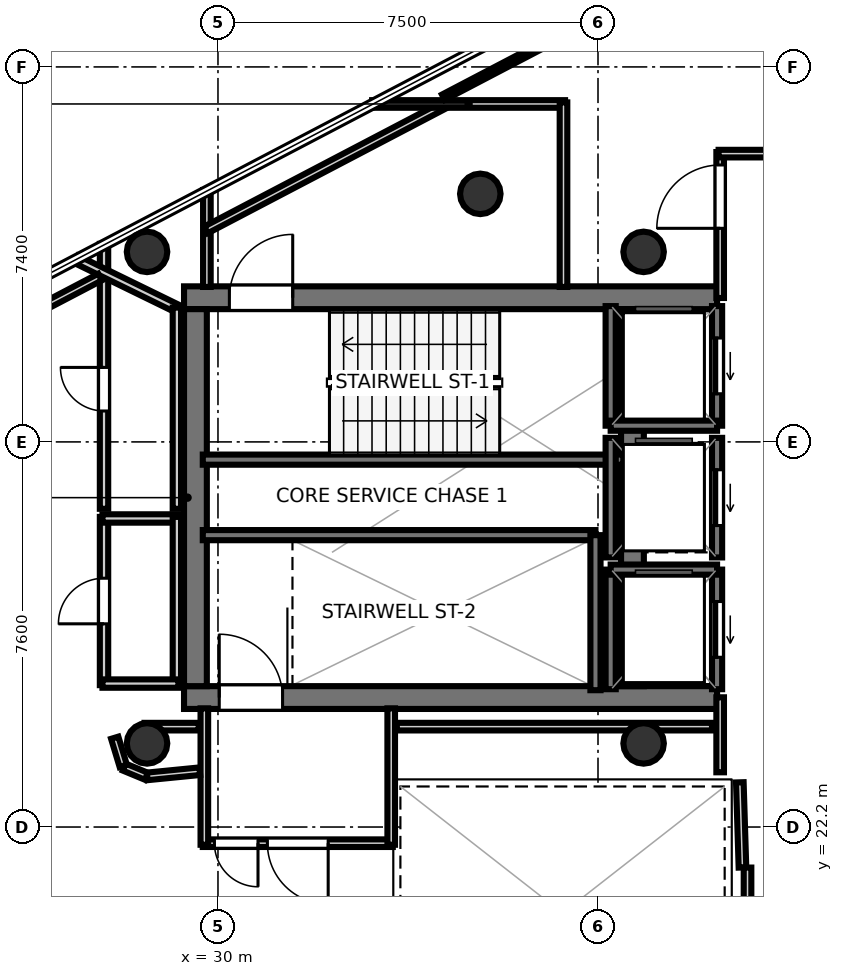
"""IFC4 building model, lengths in metres.
Left out: names, types, materials, properties, quantities, classifications, styles, units other than length and angle.
Written with IfcOpenShell. Run it as: python <this file> out.ifc"""

import sys

from ifc_helpers import new_model, si_unit, direction, frame, frame_2d, origin, origin_2d, place, context, subcontext, project, spatial, rectangle, hollow_circle, extrude, element, fill, save


model = new_model("IFC4")
c1 = context("Model", 3, precision=1e-05, world=origin(), true_north=direction((0.0, 1.0)))
c2 = subcontext(c1, "Body", "Model", "MODEL_VIEW")
j1 = project(units=[si_unit("LENGTHUNIT", "METRE"), si_unit("PLANEANGLEUNIT", "RADIAN")], contexts=[c1])
p1 = place(None, origin())
s1 = spatial("IfcSite", under=j1, at=p1, CompositionType="ELEMENT")
p2 = place(p1, origin())
s2 = spatial("IfcBuilding", under=s1, at=p2, CompositionType="ELEMENT")
p3 = place(p2, frame((0.0, 0.0, 351.8)))
s3 = spatial("IfcBuildingStorey", under=s2, at=p3, CompositionType="ELEMENT", Elevation=351.8)
p4 = place(p3, frame((29.33, 32.645, 0.0), z_axis=(0.0, 0.0, 1.0), x_axis=(1.0, 0.0, 0.0)))
e1 = element("IfcWall", 1, at=p4, inside=s3, PredefinedType="SHEAR", context=c2, shape_type="SweptSolid", body=[
    extrude(rectangle(XDim=10.52, YDim=0.45, at=frame_2d((5.26, 0.0))), origin(), (0.0, 0.0, 1.0), 4.3),
])
p5 = place(p4, frame((0.895, 0.0, 0.0)))
e2 = element("IfcOpeningElement", 2, at=p5, cuts=e1, PredefinedType="OPENING", context=c2, shape_type="SweptSolid", body=[
    extrude(rectangle(XDim=1.25, YDim=2.15, at=frame_2d((0.625, 1.075))), frame((0.0, 0.235, 0.0), z_axis=(0.0, -1.0, 0.0), x_axis=(1.0, 0.0, 0.0)), (0.0, 0.0, 1.0), 0.47),
])
p6 = place(p3, frame((29.33, 24.755, 0.0), z_axis=(0.0, 0.0, 1.0), x_axis=(1.0, 0.0, 0.0)))
e3 = element("IfcWall", 3, at=p6, inside=s3, PredefinedType="SHEAR", context=c2, shape_type="SweptSolid", body=[
    extrude(rectangle(XDim=10.52, YDim=0.45, at=frame_2d((5.26, 0.0))), origin(), (0.0, 0.0, 1.0), 4.3),
])
p7 = place(p6, frame((0.695, 0.0, 0.0)))
e4 = element("IfcOpeningElement", 4, at=p7, cuts=e3, PredefinedType="OPENING", context=c2, shape_type="SweptSolid", body=[
    extrude(rectangle(XDim=1.25, YDim=2.15, at=frame_2d((0.625, 1.075))), frame((0.0, 0.235, 0.0), z_axis=(0.0, -1.0, 0.0), x_axis=(1.0, 0.0, 0.0)), (0.0, 0.0, 1.0), 0.47),
])
for number, where, z_axis, x_axis in (
    (5, (29.555, 24.98, 0.0), (0.0, 0.0, 1.0), (0.0, 1.0, 0.0)),
    (6, (38.18, 24.98, 0.0), (0.0, 0.0, 1.0), (0.0, 1.0, 0.0)),
):
    element("IfcWall", number, at=place(p3, frame(where, z_axis=z_axis, x_axis=x_axis)), inside=s3, PredefinedType="SHEAR", context=c2, shape_type="SweptSolid", body=[
        extrude(rectangle(XDim=7.44, YDim=0.45, at=frame_2d((3.72, 0.0))), origin(), (0.0, 0.0, 1.0), 4.3),
    ])
for number, where, z_axis, x_axis in (
    (7, (28.6, 33.55, 0.0), (0.0, 0.0, 1.0), (1.0, 0.0, 0.0)),
    (8, (28.6, 23.85, 0.0), (0.0, 0.0, 1.0), (1.0, 0.0, 0.0)),
    (9, (38.4, 33.55, 0.0), (0.0, 0.0, 1.0), (1.0, 0.0, 0.0)),
    (10, (38.4, 23.85, 0.0), (0.0, 0.0, 1.0), (1.0, 0.0, 0.0)),
    (11, (35.177, 34.695, 0.0), (0.0, 0.0, 1.0), (1.0, 0.0, 0.0)),
):
    element("IfcColumn", number, at=place(p3, frame(where, z_axis=z_axis, x_axis=x_axis)), inside=s3, PredefinedType="COLUMN", context=c2, shape_type="SweptSolid", body=[
        extrude(hollow_circle(Radius=0.4, WallThickness=0.022, at=origin_2d()), origin(), (0.0, 0.0, 1.0), 4.5),
    ])
p8 = place(p3, frame((29.7, 29.45, 0.0), z_axis=(0.0, 0.0, 1.0), x_axis=(1.0, 0.0, 0.0)))
e12 = element("IfcWall", 12, at=p8, inside=s3, PredefinedType="SOLIDWALL", context=c2, shape_type="SweptSolid", body=[
    extrude(rectangle(XDim=8.3, YDim=0.2, at=frame_2d((4.15, 0.0))), origin(), (0.0, 0.0, 1.0), 4.3),
])
p9 = place(p3, frame((29.7, 27.96, 0.0), z_axis=(0.0, 0.0, 1.0), x_axis=(1.0, 0.0, 0.0)))
e13 = element("IfcWall", 13, at=p9, inside=s3, PredefinedType="SOLIDWALL", context=c2, shape_type="SweptSolid", body=[
    extrude(rectangle(XDim=7.75, YDim=0.2, at=frame_2d((3.875, 0.0))), origin(), (0.0, 0.0, 1.0), 4.3),
])
p10 = place(p3, frame((37.45, 24.9, 0.0), z_axis=(0.0, 0.0, 1.0), x_axis=(0.0, 1.0, 0.0)))
e14 = element("IfcWall", 14, at=p10, inside=s3, PredefinedType="SOLIDWALL", context=c2, shape_type="SweptSolid", body=[
    extrude(rectangle(XDim=3.06, YDim=0.2, at=frame_2d((1.53, 0.0))), origin(), (0.0, 0.0, 1.0), 4.3),
])
p11 = place(p3, frame((39.85, 30.12, 0.0), z_axis=(0.0, 0.0, 1.0), x_axis=(0.0, 1.0, 0.0)))
e15 = element("IfcWall", 15, at=p11, inside=s3, PredefinedType="SOLIDWALL", context=c2, shape_type="SweptSolid", body=[
    extrude(rectangle(XDim=2.36, YDim=0.2, at=frame_2d((1.18, 0.0))), origin(), (0.0, 0.0, 1.0), 4.3),
])
p12 = place(p11, frame((0.63, 0.0, 0.0)))
e16 = element("IfcOpeningElement", 16, at=p12, cuts=e15, PredefinedType="OPENING", context=c2, shape_type="SweptSolid", body=[
    extrude(rectangle(XDim=1.1, YDim=2.15, at=frame_2d((0.55, 1.075))), frame((0.0, 0.11, 0.0), z_axis=(0.0, -1.0, 0.0), x_axis=(1.0, 0.0, 0.0)), (0.0, 0.0, 1.0), 0.22),
])
p13 = place(p3, frame((37.75, 30.12, 0.0), z_axis=(0.0, 0.0, 1.0), x_axis=(0.0, 1.0, 0.0)))
e17 = element("IfcWall", 17, at=p13, inside=s3, PredefinedType="SOLIDWALL", context=c2, shape_type="SweptSolid", body=[
    extrude(rectangle(XDim=2.36, YDim=0.2, at=frame_2d((1.18, 0.0))), origin(), (0.0, 0.0, 1.0), 4.3),
])
p14 = place(p3, frame((37.75, 30.12, 0.0), z_axis=(0.0, 0.0, 1.0), x_axis=(1.0, 0.0, 0.0)))
e18 = element("IfcWall", 18, at=p14, inside=s3, PredefinedType="SOLIDWALL", context=c2, shape_type="SweptSolid", body=[
    extrude(rectangle(XDim=2.1, YDim=0.2, at=frame_2d((1.05, 0.0))), origin(), (0.0, 0.0, 1.0), 4.3),
])
p15 = place(p3, frame((39.85, 24.92, 0.0), z_axis=(0.0, 0.0, 1.0), x_axis=(0.0, 1.0, 0.0)))
e19 = element("IfcWall", 19, at=p15, inside=s3, PredefinedType="SOLIDWALL", context=c2, shape_type="SweptSolid", body=[
    extrude(rectangle(XDim=2.36, YDim=0.2, at=frame_2d((1.18, 0.0))), origin(), (0.0, 0.0, 1.0), 4.3),
])
p16 = place(p15, frame((0.63, 0.0, 0.0)))
e20 = element("IfcOpeningElement", 20, at=p16, cuts=e19, PredefinedType="OPENING", context=c2, shape_type="SweptSolid", body=[
    extrude(rectangle(XDim=1.1, YDim=2.15, at=frame_2d((0.55, 1.075))), frame((0.0, 0.11, 0.0), z_axis=(0.0, -1.0, 0.0), x_axis=(1.0, 0.0, 0.0)), (0.0, 0.0, 1.0), 0.22),
])
p17 = place(p3, frame((37.75, 24.92, 0.0), z_axis=(0.0, 0.0, 1.0), x_axis=(0.0, 1.0, 0.0)))
e21 = element("IfcWall", 21, at=p17, inside=s3, PredefinedType="SOLIDWALL", context=c2, shape_type="SweptSolid", body=[
    extrude(rectangle(XDim=2.36, YDim=0.2, at=frame_2d((1.18, 0.0))), origin(), (0.0, 0.0, 1.0), 4.3),
])
p18 = place(p3, frame((37.75, 27.28, 0.0), z_axis=(0.0, 0.0, 1.0), x_axis=(1.0, 0.0, 0.0)))
e22 = element("IfcWall", 22, at=p18, inside=s3, PredefinedType="SOLIDWALL", context=c2, shape_type="SweptSolid", body=[
    extrude(rectangle(XDim=2.1, YDim=0.2, at=frame_2d((1.05, 0.0))), origin(), (0.0, 0.0, 1.0), 4.3),
])
p19 = place(p3, frame((39.85, 27.52, 0.0), z_axis=(0.0, 0.0, 1.0), x_axis=(0.0, 1.0, 0.0)))
e23 = element("IfcWall", 23, at=p19, inside=s3, PredefinedType="SOLIDWALL", context=c2, shape_type="SweptSolid", body=[
    extrude(rectangle(XDim=2.36, YDim=0.2, at=frame_2d((1.18, 0.0))), origin(), (0.0, 0.0, 1.0), 4.3),
])
p20 = place(p19, frame((0.63, 0.0, 0.0)))
e24 = element("IfcOpeningElement", 24, at=p20, cuts=e23, PredefinedType="OPENING", context=c2, shape_type="SweptSolid", body=[
    extrude(rectangle(XDim=1.1, YDim=2.15, at=frame_2d((0.55, 1.075))), frame((0.0, 0.11, 0.0), z_axis=(0.0, -1.0, 0.0), x_axis=(1.0, 0.0, 0.0)), (0.0, 0.0, 1.0), 0.22),
])
p21 = place(p3, frame((37.75, 27.52, 0.0), z_axis=(0.0, 0.0, 1.0), x_axis=(0.0, 1.0, 0.0)))
e25 = element("IfcWall", 25, at=p21, inside=s3, PredefinedType="SOLIDWALL", context=c2, shape_type="SweptSolid", body=[
    extrude(rectangle(XDim=2.36, YDim=0.2, at=frame_2d((1.18, 0.0))), origin(), (0.0, 0.0, 1.0), 4.3),
])
p22 = place(p3, frame((29.781, 32.858, 0.0), z_axis=(0.0, 0.0, 1.0), x_axis=(0.0, 1.0, 0.0)))
e26 = element("IfcWall", 26, at=p22, inside=s3, PredefinedType="PARTITIONING", context=c2, shape_type="SweptSolid", body=[
    extrude(rectangle(XDim=1.913, YDim=0.15, at=frame_2d((0.957, 0.0))), origin(), (0.0, 0.0, 1.0), 2.82),
])
p23 = place(p3, frame((29.764, 33.985, 0.0), z_axis=(0.0, 0.0, 1.0), x_axis=(0.885903695569, 0.46386920805, 0.0)))
e27 = element("IfcWall", 27, at=p23, inside=s3, PredefinedType="PARTITIONING", context=c2, shape_type="SweptSolid", body=[
    extrude(rectangle(XDim=5.363, YDim=0.15, at=frame_2d((2.682, 0.0))), origin(), (0.0, 0.0, 1.0), 2.82),
])
p24 = place(p3, frame((33.042, 36.469, 0.0), z_axis=(0.0, 0.0, 1.0), x_axis=(1.0, 0.0, 0.0)))
e28 = element("IfcWall", 28, at=p24, inside=s3, PredefinedType="PARTITIONING", context=c2, shape_type="SweptSolid", body=[
    extrude(rectangle(XDim=3.808, YDim=0.15, at=frame_2d((1.904, 0.0))), origin(), (0.0, 0.0, 1.0), 2.82),
])
p25 = place(p3, frame((36.819, 36.5, 0.0), z_axis=(0.0, 0.0, 1.0), x_axis=(0.0, -1.0, 0.0)))
e29 = element("IfcWall", 29, at=p25, inside=s3, PredefinedType="PARTITIONING", context=c2, shape_type="SweptSolid", body=[
    extrude(rectangle(XDim=3.642, YDim=0.15, at=frame_2d((1.821, 0.0))), origin(), (0.0, 0.0, 1.0), 2.82),
])
p26 = place(p3, frame((33.45, 21.881, 0.0), z_axis=(0.0, 0.0, 1.0), x_axis=(-1.0, 0.0, 0.0)))
e30 = element("IfcWall", 30, at=p26, inside=s3, PredefinedType="PARTITIONING", context=c2, shape_type="SweptSolid", body=[
    extrude(rectangle(XDim=3.75, YDim=0.15, at=frame_2d((1.875, 0.0))), origin(), (0.0, 0.0, 1.0), 2.82),
])
p27 = place(p26, frame((1.275, 0.0, 0.0)))
e31 = element("IfcOpeningElement", 31, at=p27, cuts=e30, PredefinedType="OPENING", context=c2, shape_type="SweptSolid", body=[
    extrude(rectangle(XDim=1.2, YDim=2.15, at=frame_2d((0.6, 1.075))), frame((0.0, 0.085, 0.0), z_axis=(0.0, -1.0, 0.0), x_axis=(1.0, 0.0, 0.0)), (0.0, 0.0, 1.0), 0.17),
])
p28 = place(p26, frame((2.66, 0.0, 0.0)))
e32 = element("IfcOpeningElement", 32, at=p28, cuts=e30, PredefinedType="OPENING", context=c2, shape_type="SweptSolid", body=[
    extrude(rectangle(XDim=0.86, YDim=2.05, at=frame_2d((0.43, 1.025))), frame((0.0, 0.085, 0.0), z_axis=(0.0, -1.0, 0.0), x_axis=(1.0, 0.0, 0.0)), (0.0, 0.0, 1.0), 0.17),
])
for number, where, z_axis, x_axis in (
    (33, (29.731, 21.85, 0.0), (0.0, 0.0, 1.0), (0.0, 1.0, 0.0)),
    (34, (33.419, 24.542, 0.0), (0.0, 0.0, 1.0), (0.0, -1.0, 0.0)),
):
    element("IfcWall", number, at=place(p3, frame(where, z_axis=z_axis, x_axis=x_axis)), inside=s3, PredefinedType="PARTITIONING", context=c2, shape_type="SweptSolid", body=[
        extrude(rectangle(XDim=2.692, YDim=0.15, at=frame_2d((1.346, 0.0))), origin(), (0.0, 0.0, 1.0), 2.82),
    ])
p29 = place(p3, frame((40.351, 21.401, 0.0), z_axis=(0.0, 0.0, 1.0), x_axis=(-0.031058045979, 0.999517582527, 0.0)))
e35 = element("IfcWall", 35, at=p29, inside=s3, PredefinedType="PARTITIONING", context=c2, shape_type="SweptSolid", body=[
    extrude(rectangle(XDim=1.682, YDim=0.15, at=frame_2d((0.841, 0.0))), origin(), (0.0, 0.0, 1.0), 2.82),
])
p30 = place(p3, frame((39.911, 23.28, 0.0), z_axis=(0.0, 0.0, 1.0), x_axis=(0.0, 1.0, 0.0)))
e36 = element("IfcWall", 36, at=p30, inside=s3, PredefinedType="PARTITIONING", context=c2, shape_type="SweptSolid", body=[
    extrude(rectangle(XDim=1.48, YDim=0.15, at=frame_2d((0.74, 0.0))), origin(), (0.0, 0.0, 1.0), 2.82),
])
p31 = place(p3, frame((39.911, 32.64, 0.0), z_axis=(0.0, 0.0, 1.0), x_axis=(0.0, 1.0, 0.0)))
e37 = element("IfcWall", 37, at=p31, inside=s3, PredefinedType="PARTITIONING", context=c2, shape_type="SweptSolid", body=[
    extrude(rectangle(XDim=2.88, YDim=0.15, at=frame_2d((1.44, 0.0))), origin(), (0.0, 0.0, 1.0), 2.82),
])
p32 = place(p31, frame((1.375, 0.0, 0.0)))
e38 = element("IfcOpeningElement", 38, at=p32, cuts=e37, PredefinedType="OPENING", context=c2, shape_type="SweptSolid", body=[
    extrude(rectangle(XDim=1.25, YDim=2.2, at=frame_2d((0.625, 1.1))), frame((0.0, 0.085, 0.0), z_axis=(0.0, -1.0, 0.0), x_axis=(1.0, 0.0, 0.0)), (0.0, 0.0, 1.0), 0.17),
])
p33 = place(p3, frame((39.88, 35.489, 0.0), z_axis=(0.0, 0.0, 1.0), x_axis=(1.0, 0.0, 0.0)))
e39 = element("IfcWall", 39, at=p33, inside=s3, PredefinedType="PARTITIONING", context=c2, shape_type="SweptSolid", body=[
    extrude(rectangle(XDim=1.48, YDim=0.15, at=frame_2d((0.74, 0.0))), origin(), (0.0, 0.0, 1.0), 2.82),
])
p34 = place(p3, frame((40.451, 18.08, 0.0), z_axis=(0.0, 0.0, 1.0), x_axis=(0.0, 1.0, 0.0)))
e40 = element("IfcWall", 40, at=p34, inside=s3, PredefinedType="PARTITIONING", context=c2, shape_type="SweptSolid", body=[
    extrude(rectangle(XDim=3.32, YDim=0.15, at=frame_2d((1.66, 0.0))), origin(), (0.0, 0.0, 1.0), 2.82),
])
p35 = place(p3, frame((27.751, 25.0, 0.0), z_axis=(0.0, 0.0, 1.0), x_axis=(0.0, 1.0, 0.0)))
e41 = element("IfcWall", 41, at=p35, inside=s3, PredefinedType="PLUMBINGWALL", context=c2, shape_type="SweptSolid", body=[
    extrude(rectangle(XDim=3.32, YDim=0.165, at=frame_2d((1.66, 0.0))), origin(), (0.0, 0.0, 1.0), 2.82),
])
p36 = place(p35, frame((1.21, 0.0, 0.0)))
e42 = element("IfcOpeningElement", 42, at=p36, cuts=e41, PredefinedType="OPENING", context=c2, shape_type="SweptSolid", body=[
    extrude(rectangle(XDim=0.9, YDim=2.1, at=frame_2d((0.45, 1.05))), frame((0.0, 0.093, 0.0), z_axis=(0.0, -1.0, 0.0), x_axis=(1.0, 0.0, 0.0)), (0.0, 0.0, 1.0), 0.185),
])
p37 = place(p3, frame((27.72, 28.289, 0.0), z_axis=(0.0, 0.0, 1.0), x_axis=(1.0, 0.0, 0.0)))
e43 = element("IfcWall", 43, at=p37, inside=s3, PredefinedType="PLUMBINGWALL", context=c2, shape_type="SweptSolid", body=[
    extrude(rectangle(XDim=1.5, YDim=0.165, at=frame_2d((0.75, 0.0))), origin(), (0.0, 0.0, 1.0), 2.82),
])
p38 = place(p3, frame((29.189, 28.32, 0.0), z_axis=(0.0, 0.0, 1.0), x_axis=(0.0, -1.0, 0.0)))
e44 = element("IfcWall", 44, at=p38, inside=s3, PredefinedType="PLUMBINGWALL", context=c2, shape_type="SweptSolid", body=[
    extrude(rectangle(XDim=3.32, YDim=0.165, at=frame_2d((1.66, 0.0))), origin(), (0.0, 0.0, 1.0), 2.82),
])
p39 = place(p3, frame((29.22, 25.031, 0.0), z_axis=(0.0, 0.0, 1.0), x_axis=(-1.0, 0.0, 0.0)))
e45 = element("IfcWall", 45, at=p39, inside=s3, PredefinedType="PLUMBINGWALL", context=c2, shape_type="SweptSolid", body=[
    extrude(rectangle(XDim=1.5, YDim=0.165, at=frame_2d((0.75, 0.0))), origin(), (0.0, 0.0, 1.0), 2.82),
])
p40 = place(p3, frame((27.751, 28.48, 0.0), z_axis=(0.0, 0.0, 1.0), x_axis=(0.0, 1.0, 0.0)))
e46 = element("IfcWall", 46, at=p40, inside=s3, PredefinedType="PLUMBINGWALL", context=c2, shape_type="SweptSolid", body=[
    extrude(rectangle(XDim=5.228, YDim=0.165, at=frame_2d((2.614, 0.0))), origin(), (0.0, 0.0, 1.0), 2.82),
])
p41 = place(p40, frame((1.93, 0.0, 0.0)))
e47 = element("IfcOpeningElement", 47, at=p41, cuts=e46, PredefinedType="OPENING", context=c2, shape_type="SweptSolid", body=[
    extrude(rectangle(XDim=0.86, YDim=2.05, at=frame_2d((0.43, 1.025))), frame((0.0, 0.093, 0.0), z_axis=(0.0, -1.0, 0.0), x_axis=(1.0, 0.0, 0.0)), (0.0, 0.0, 1.0), 0.185),
])
p42 = place(p3, frame((27.205, 33.402, 0.0), z_axis=(0.0, 0.0, 1.0), x_axis=(0.898698306797, -0.438567387479, 0.0)))
e48 = element("IfcWall", 48, at=p42, inside=s3, PredefinedType="PLUMBINGWALL", context=c2, shape_type="SweptSolid", body=[
    extrude(rectangle(XDim=2.242, YDim=0.165, at=frame_2d((1.121, 0.0))), origin(), (0.0, 0.0, 1.0), 2.82),
])
p43 = place(p3, frame((29.189, 32.45, 0.0), z_axis=(0.0, 0.0, 1.0), x_axis=(0.0, -1.0, 0.0)))
e49 = element("IfcWall", 49, at=p43, inside=s3, PredefinedType="PLUMBINGWALL", context=c2, shape_type="SweptSolid", body=[
    extrude(rectangle(XDim=3.97, YDim=0.165, at=frame_2d((1.985, 0.0))), origin(), (0.0, 0.0, 1.0), 2.82),
])
p44 = place(p3, frame((29.62, 24.181, 0.0), z_axis=(0.0, 0.0, 1.0), x_axis=(-1.0, 0.0, 0.0)))
e50 = element("IfcWall", 50, at=p44, inside=s3, PredefinedType="PARTITIONING", context=c2, shape_type="SweptSolid", body=[
    extrude(rectangle(XDim=1.07, YDim=0.15, at=frame_2d((0.535, 0.0))), origin(), (0.0, 0.0, 1.0), 2.82),
])
p45 = place(p3, frame((39.75, 24.181, 0.0), z_axis=(0.0, 0.0, 1.0), x_axis=(-1.0, 0.0, 0.0)))
e51 = element("IfcWall", 51, at=p45, inside=s3, PredefinedType="PARTITIONING", context=c2, shape_type="SweptSolid", body=[
    extrude(rectangle(XDim=6.22, YDim=0.15, at=frame_2d((3.11, 0.0))), origin(), (0.0, 0.0, 1.0), 2.82),
])
p46 = place(p3, frame((25.615, 31.975, 0.0), z_axis=(0.0, 0.0, 1.0), x_axis=(0.885882957488, 0.463908811763, 0.0)))
e52 = element("IfcWall", 52, at=p46, inside=s3, PredefinedType="PARTITIONING", context=c2, shape_type="SweptSolid", body=[
    extrude(rectangle(XDim=2.323, YDim=0.15, at=frame_2d((1.162, 0.0))), origin(), (0.0, 0.0, 1.0), 2.82),
])
p47 = place(p3, frame((27.962, 23.962, 0.0), z_axis=(0.0, 0.0, 1.0), x_axis=(0.290297203178, -0.956936535945, 0.0)))
e53 = element("IfcWall", 53, at=p47, inside=s3, PredefinedType="PARTITIONING", context=c2, shape_type="SweptSolid", body=[
    extrude(rectangle(XDim=0.584, YDim=0.15, at=frame_2d((0.292, 0.0))), origin(), (0.0, 0.0, 1.0), 2.82),
])
p48 = place(p3, frame((28.15, 23.383, 0.0), z_axis=(0.0, 0.0, 1.0), x_axis=(0.92386635704, -0.382715239219, 0.0)))
e54 = element("IfcWall", 54, at=p48, inside=s3, PredefinedType="PARTITIONING", context=c2, shape_type="SweptSolid", body=[
    extrude(rectangle(XDim=0.475, YDim=0.15, at=frame_2d((0.237, 0.0))), origin(), (0.0, 0.0, 1.0), 2.82),
])
p49 = place(p3, frame((28.603, 23.199, 0.0), z_axis=(0.0, 0.0, 1.0), x_axis=(0.995179827095, 0.098066873836, 0.0)))
e55 = element("IfcWall", 55, at=p49, inside=s3, PredefinedType="PARTITIONING", context=c2, shape_type="SweptSolid", body=[
    extrude(rectangle(XDim=1.043, YDim=0.15, at=frame_2d((0.521, 0.0))), origin(), (0.0, 0.0, 1.0), 2.82),
])
p50 = place(p3, frame((34.448, 36.601, 0.0), z_axis=(0.0, 0.0, 1.0), x_axis=(0.885897810841, 0.46388044661, 0.0)))
e56 = element("IfcWall", 56, at=p50, inside=s3, PredefinedType="PARTITIONING", context=c2, shape_type="SweptSolid", body=[
    extrude(rectangle(XDim=16.148, YDim=0.12, at=frame_2d((8.074, 0.0))), origin(), (0.0, 0.0, 1.0), 2.82),
])
p51 = place(p5, origin())
e57 = element("IfcDoor", 57, at=p51, inside=s3, OperationType="SINGLE_SWING_RIGHT", PredefinedType="DOOR", context=c2, shape_type="SweptSolid", body=[
    extrude(rectangle(XDim=1.25, YDim=2.15, at=frame_2d((0.625, 1.075))), frame((0.0, 0.025, 0.0), z_axis=(0.0, -1.0, 0.0), x_axis=(1.0, 0.0, 0.0)), (0.0, 0.0, 1.0), 0.05),
])
fill(e2, e57)
p52 = place(p7, origin())
e58 = element("IfcDoor", 58, at=p52, inside=s3, OperationType="SINGLE_SWING_LEFT", PredefinedType="DOOR", context=c2, shape_type="SweptSolid", body=[
    extrude(rectangle(XDim=1.25, YDim=2.15, at=frame_2d((0.625, 1.075))), frame((0.0, 0.025, 0.0), z_axis=(0.0, -1.0, 0.0), x_axis=(1.0, 0.0, 0.0)), (0.0, 0.0, 1.0), 0.05),
])
fill(e4, e58)
p53 = place(p12, origin())
e59 = element("IfcDoor", 59, at=p53, inside=s3, OperationType="SLIDING_TO_LEFT", PredefinedType="DOOR", context=c2, shape_type="SweptSolid", body=[
    extrude(rectangle(XDim=1.1, YDim=2.15, at=frame_2d((0.55, 1.075))), frame((0.0, 0.025, 0.0), z_axis=(0.0, -1.0, 0.0), x_axis=(1.0, 0.0, 0.0)), (0.0, 0.0, 1.0), 0.05),
])
fill(e16, e59)
p54 = place(p16, origin())
e60 = element("IfcDoor", 60, at=p54, inside=s3, OperationType="SLIDING_TO_LEFT", PredefinedType="DOOR", context=c2, shape_type="SweptSolid", body=[
    extrude(rectangle(XDim=1.1, YDim=2.15, at=frame_2d((0.55, 1.075))), frame((0.0, 0.025, 0.0), z_axis=(0.0, -1.0, 0.0), x_axis=(1.0, 0.0, 0.0)), (0.0, 0.0, 1.0), 0.05),
])
fill(e20, e60)
p55 = place(p20, origin())
e61 = element("IfcDoor", 61, at=p55, inside=s3, OperationType="SLIDING_TO_LEFT", PredefinedType="DOOR", context=c2, shape_type="SweptSolid", body=[
    extrude(rectangle(XDim=1.1, YDim=2.15, at=frame_2d((0.55, 1.075))), frame((0.0, 0.025, 0.0), z_axis=(0.0, -1.0, 0.0), x_axis=(1.0, 0.0, 0.0)), (0.0, 0.0, 1.0), 0.05),
])
fill(e24, e61)
p56 = place(p27, origin())
e62 = element("IfcDoor", 62, at=p56, inside=s3, OperationType="SINGLE_SWING_LEFT", PredefinedType="DOOR", context=c2, shape_type="SweptSolid", body=[
    extrude(rectangle(XDim=1.2, YDim=2.15, at=frame_2d((0.6, 1.075))), frame((0.0, 0.025, 0.0), z_axis=(0.0, -1.0, 0.0), x_axis=(1.0, 0.0, 0.0)), (0.0, 0.0, 1.0), 0.05),
])
fill(e31, e62)
p57 = place(p36, origin())
e63 = element("IfcDoor", 63, at=p57, inside=s3, OperationType="SINGLE_SWING_LEFT", PredefinedType="DOOR", context=c2, shape_type="SweptSolid", body=[
    extrude(rectangle(XDim=0.9, YDim=2.1, at=frame_2d((0.45, 1.05))), frame((0.0, 0.025, 0.0), z_axis=(0.0, -1.0, 0.0), x_axis=(1.0, 0.0, 0.0)), (0.0, 0.0, 1.0), 0.05),
])
fill(e42, e63)
p58 = place(p41, origin())
e64 = element("IfcDoor", 64, at=p58, inside=s3, OperationType="SINGLE_SWING_RIGHT", PredefinedType="DOOR", context=c2, shape_type="SweptSolid", body=[
    extrude(rectangle(XDim=0.86, YDim=2.05, at=frame_2d((0.43, 1.025))), frame((0.0, 0.025, 0.0), z_axis=(0.0, -1.0, 0.0), x_axis=(1.0, 0.0, 0.0)), (0.0, 0.0, 1.0), 0.05),
])
fill(e47, e64)
p59 = place(p28, origin())
e65 = element("IfcDoor", 65, at=p59, inside=s3, OperationType="SINGLE_SWING_LEFT", PredefinedType="DOOR", context=c2, shape_type="SweptSolid", body=[
    extrude(rectangle(XDim=0.86, YDim=2.05, at=frame_2d((0.43, 1.025))), frame((0.0, 0.025, 0.0), z_axis=(0.0, -1.0, 0.0), x_axis=(1.0, 0.0, 0.0)), (0.0, 0.0, 1.0), 0.05),
])
fill(e32, e65)
p60 = place(p32, origin())
e66 = element("IfcDoor", 66, at=p60, inside=s3, OperationType="SINGLE_SWING_LEFT", PredefinedType="DOOR", context=c2, shape_type="SweptSolid", body=[
    extrude(rectangle(XDim=1.25, YDim=2.2, at=frame_2d((0.625, 1.1))), frame((0.0, 0.025, 0.0), z_axis=(0.0, -1.0, 0.0), x_axis=(1.0, 0.0, 0.0)), (0.0, 0.0, 1.0), 0.05),
])
fill(e38, e66)
save(model, sys.argv[1])
